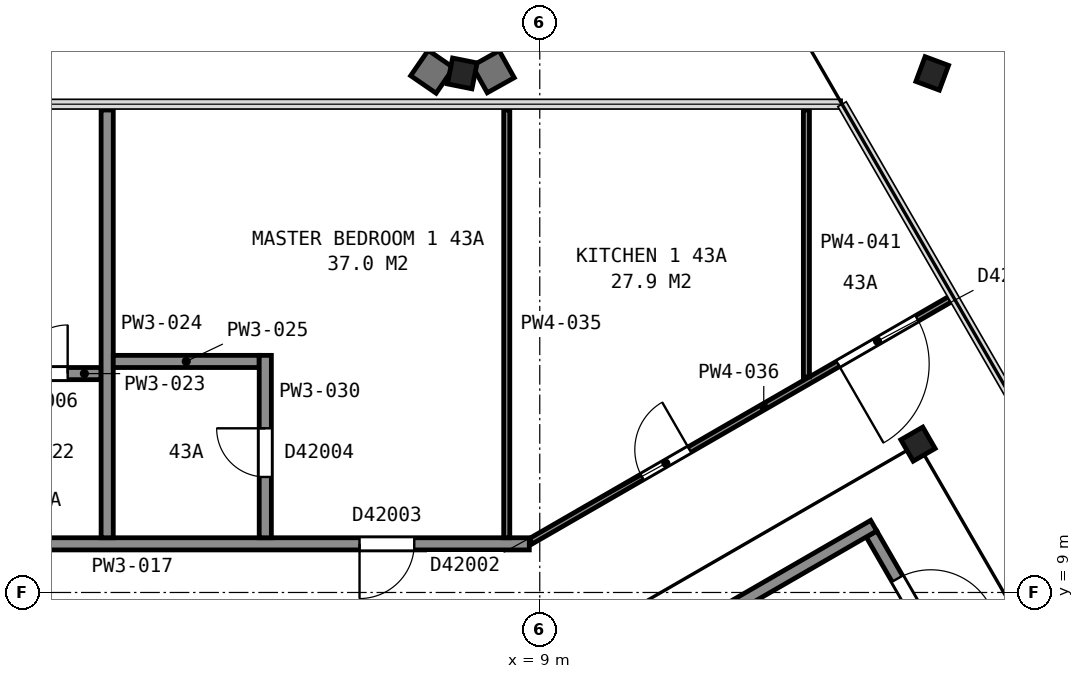
"""IFC4 building model, lengths in metres.
Left out: names, types, materials, properties, quantities, classifications, styles, units other than length and angle.
Written with IfcOpenShell. Run it as: python <this file> out.ifc"""

import sys

from ifc_helpers import new_model, si_unit, direction, frame, frame_2d, origin, origin_2d, place, context, subcontext, project, spatial, rectangle, i_section, extrude, element, fill, save


model = new_model("IFC4")
c1 = context("Model", 3, precision=1e-05, world=origin(), true_north=direction((0.0, 1.0)))
c2 = subcontext(c1, "Body", "Model", "MODEL_VIEW")
j1 = project(units=[si_unit("LENGTHUNIT", "METRE"), si_unit("PLANEANGLEUNIT", "RADIAN")], contexts=[c1])
p1 = place(None, origin())
s1 = spatial("IfcSite", under=j1, at=p1, CompositionType="ELEMENT")
p2 = place(p1, origin())
s2 = spatial("IfcBuilding", under=s1, at=p2, CompositionType="ELEMENT")
p3 = place(p2, frame((0.0, 0.0, 174.7)))
s3 = spatial("IfcBuildingStorey", under=s2, at=p3, CompositionType="ELEMENT", Elevation=174.7)
p4 = place(p3, frame((15.373, 17.318, 0.04), z_axis=(0.06888386825, 0.185431142459, 0.980239921704), x_axis=(0.997540564772, -4.290776e-05, -0.070091510131)))
e1 = element("IfcColumn", 1, at=p4, inside=s3, PredefinedType="COLUMN", context=c2, shape_type="SweptSolid", body=[
    extrude(i_section(OverallWidth=0.411, OverallDepth=0.434, WebThickness=0.036, FlangeThickness=0.057, FilletRadius=0.015, at=origin_2d()), origin(), (0.0, 0.0, 1.0), 3.693),
])
p5 = place(p3, frame((7.681, 17.317, 0.035), z_axis=(0.037114816882, 0.18577220621, 0.981891632395), x_axis=(0.999284884786, 0.000205075441, -0.037811069577)))
e2 = element("IfcColumn", 2, at=p5, inside=s3, PredefinedType="COLUMN", context=c2, shape_type="SweptSolid", body=[
    extrude(i_section(OverallWidth=0.411, OverallDepth=0.434, WebThickness=0.036, FlangeThickness=0.057, FilletRadius=0.015, at=origin_2d()), origin(), (0.0, 0.0, 1.0), 3.697),
])
p6 = place(p3, frame((15.22, 11.44, 0.0), z_axis=(0.0, 0.0, 1.0), x_axis=(0.5, -0.866025403784, 0.0)))
e3 = element("IfcColumn", 3, at=p6, inside=s3, PredefinedType="COLUMN", context=c2, shape_type="SweptSolid", body=[
    extrude(i_section(OverallWidth=0.406, OverallDepth=0.417, WebThickness=0.03, FlangeThickness=0.048, FilletRadius=0.015, at=origin_2d()), origin(), (0.0, 0.0, 1.0), 3.7),
])
p7 = place(p3, frame((15.855, 7.538, 0.0), z_axis=(0.0, 0.0, 1.0), x_axis=(-0.500049511043, 0.865996816683, 0.0)))
e4 = element("IfcWall", 4, at=p7, inside=s3, PredefinedType="PARTITIONING", context=c2, shape_type="SweptSolid", body=[
    extrude(rectangle(XDim=2.8, YDim=0.2, at=frame_2d((1.4, 0.0))), origin(), (0.0, 0.0, 1.0), 3.45),
])
p8 = place(p7, frame((0.85, 0.0, 0.0)))
e5 = element("IfcOpeningElement", 5, at=p8, cuts=e4, PredefinedType="OPENING", context=c2, shape_type="SweptSolid", body=[
    extrude(rectangle(XDim=1.1, YDim=2.1, at=frame_2d((0.55, 1.05))), frame((0.0, 0.11, 0.0), z_axis=(0.0, -1.0, 0.0), x_axis=(1.0, 0.0, 0.0)), (0.0, 0.0, 1.0), 0.22),
])
p9 = place(p3, frame((6.178, 5.299, 0.0), z_axis=(0.0, 0.0, 1.0), x_axis=(0.866019993635, 0.500009370536, 0.0)))
e6 = element("IfcWall", 6, at=p9, inside=s3, PredefinedType="PARTITIONING", context=c2, shape_type="SweptSolid", body=[
    extrude(rectangle(XDim=9.6, YDim=0.2, at=frame_2d((4.8, 0.0))), origin(), (0.0, 0.0, 1.0), 3.45),
])
p10 = place(p3, frame((-8.828, 9.8, 0.0), z_axis=(0.0, 0.0, 1.0), x_axis=(1.0, 0.0, 0.0)))
e7 = element("IfcWall", 7, at=p10, inside=s3, PredefinedType="PARTITIONING", context=c2, shape_type="SweptSolid", body=[
    extrude(rectangle(XDim=17.656, YDim=0.2, at=frame_2d((8.828, 0.0))), origin(), (0.0, 0.0, 1.0), 2.713),
])
p11 = place(p10, frame((14.864, 0.0, 0.0)))
e8 = element("IfcOpeningElement", 8, at=p11, cuts=e7, PredefinedType="OPENING", context=c2, shape_type="SweptSolid", body=[
    extrude(rectangle(XDim=0.9, YDim=2.1, at=frame_2d((0.45, 1.05))), frame((0.0, 0.11, 0.0), z_axis=(0.0, -1.0, 0.0), x_axis=(1.0, 0.0, 0.0)), (0.0, 0.0, 1.0), 0.22),
])
p12 = place(p10, frame((6.488, 0.0, 0.0)))
e9 = element("IfcOpeningElement", 9, at=p12, cuts=e7, PredefinedType="OPENING", context=c2, shape_type="SweptSolid", body=[
    extrude(rectangle(XDim=0.9, YDim=2.1, at=frame_2d((0.45, 1.05))), frame((0.0, 0.11, 0.0), z_axis=(0.0, -1.0, 0.0), x_axis=(1.0, 0.0, 0.0)), (0.0, 0.0, 1.0), 0.22),
])
p13 = place(p10, frame((2.2, 0.0, 0.0)))
e10 = element("IfcOpeningElement", 10, at=p13, cuts=e7, PredefinedType="OPENING", context=c2, shape_type="SweptSolid", body=[
    extrude(rectangle(XDim=0.9, YDim=2.1, at=frame_2d((0.45, 1.05))), frame((0.0, 0.11, 0.0), z_axis=(0.0, -1.0, 0.0), x_axis=(1.0, 0.0, 0.0)), (0.0, 0.0, 1.0), 0.22),
])
p14 = place(p3, frame((1.786, 12.6, 0.0), z_axis=(0.0, 0.0, 1.0), x_axis=(-1.0, 0.0, 0.0)))
e11 = element("IfcWall", 11, at=p14, inside=s3, PredefinedType="PARTITIONING", context=c2, shape_type="SweptSolid", body=[
    extrude(rectangle(XDim=1.9, YDim=0.2, at=frame_2d((0.95, 0.0))), origin(), (0.0, 0.0, 1.0), 2.713),
])
p15 = place(p14, frame((0.55, 0.0, 0.0)))
e12 = element("IfcOpeningElement", 12, at=p15, cuts=e11, PredefinedType="OPENING", context=c2, shape_type="SweptSolid", body=[
    extrude(rectangle(XDim=0.8, YDim=2.1, at=frame_2d((0.4, 1.05))), frame((0.0, 0.11, 0.0), z_axis=(0.0, -1.0, 0.0), x_axis=(1.0, 0.0, 0.0)), (0.0, 0.0, 1.0), 0.22),
])
p16 = place(p3, frame((1.886, 9.9, 0.0), z_axis=(0.0, 0.0, 1.0), x_axis=(0.0, 1.0, 0.0)))
e13 = element("IfcWall", 13, at=p16, inside=s3, PredefinedType="PARTITIONING", context=c2, shape_type="SweptSolid", body=[
    extrude(rectangle(XDim=7.035, YDim=0.2, at=frame_2d((3.518, 0.0))), origin(), (0.0, 0.0, 1.0), 2.713),
])
p17 = place(p3, frame((1.986, 12.8, 0.0), z_axis=(0.0, 0.0, 1.0), x_axis=(1.0, 0.0, 0.0)))
e14 = element("IfcWall", 14, at=p17, inside=s3, PredefinedType="PARTITIONING", context=c2, shape_type="SweptSolid", body=[
    extrude(rectangle(XDim=2.4, YDim=0.2, at=frame_2d((1.2, 0.0))), origin(), (0.0, 0.0, 1.0), 2.713),
])
p18 = place(p3, frame((4.486, 9.9, 0.0), z_axis=(0.0, 0.0, 1.0), x_axis=(0.0, 1.0, 0.0)))
e15 = element("IfcWall", 15, at=p18, inside=s3, PredefinedType="PARTITIONING", context=c2, shape_type="SweptSolid", body=[
    extrude(rectangle(XDim=3.0, YDim=0.2, at=frame_2d((1.5, 0.0))), origin(), (0.0, 0.0, 1.0), 2.713),
])
p19 = place(p18, frame((1.0, 0.0, 0.0)))
e16 = element("IfcOpeningElement", 16, at=p19, cuts=e15, PredefinedType="OPENING", context=c2, shape_type="SweptSolid", body=[
    extrude(rectangle(XDim=0.8, YDim=2.1, at=frame_2d((0.4, 1.05))), frame((0.0, 0.11, 0.0), z_axis=(0.0, -1.0, 0.0), x_axis=(1.0, 0.0, 0.0)), (0.0, 0.0, 1.0), 0.22),
])
p20 = place(p3, frame((8.457, 9.9, 0.0), z_axis=(0.0, 0.0, 1.0), x_axis=(0.0, 1.0, 0.0)))
e17 = element("IfcWall", 17, at=p20, inside=s3, PredefinedType="PARTITIONING", context=c2, shape_type="SweptSolid", body=[
    extrude(rectangle(XDim=7.035, YDim=0.1, at=frame_2d((3.518, 0.0))), origin(), (0.0, 0.0, 1.0), 2.713),
])
p21 = place(p3, frame((8.852, 9.843, 0.0), z_axis=(0.0, 0.0, 1.0), x_axis=(0.866086037714, 0.499894964244, 0.0)))
e18 = element("IfcWall", 18, at=p21, inside=s3, PredefinedType="PARTITIONING", context=c2, shape_type="SweptSolid", body=[
    extrude(rectangle(XDim=7.963, YDim=0.1, at=frame_2d((3.981, 0.0))), origin(), (0.0, 0.0, 1.0), 2.713),
])
p22 = place(p21, frame((5.834, 0.0, 0.0)))
e19 = element("IfcOpeningElement", 19, at=p22, cuts=e18, PredefinedType="OPENING", context=c2, shape_type="SweptSolid", body=[
    extrude(rectangle(XDim=1.5, YDim=2.1, at=frame_2d((0.75, 1.05))), frame((0.0, 0.06, 0.0), z_axis=(0.0, -1.0, 0.0), x_axis=(1.0, 0.0, 0.0)), (0.0, 0.0, 1.0), 0.12),
])
p23 = place(p21, frame((2.115, 0.0, 0.0)))
e20 = element("IfcOpeningElement", 20, at=p23, cuts=e18, PredefinedType="OPENING", context=c2, shape_type="SweptSolid", body=[
    extrude(rectangle(XDim=0.9, YDim=2.1, at=frame_2d((0.45, 1.05))), frame((0.0, 0.06, 0.0), z_axis=(0.0, -1.0, 0.0), x_axis=(1.0, 0.0, 0.0)), (0.0, 0.0, 1.0), 0.12),
])
p24 = place(p3, frame((13.385, 12.546, 0.0), z_axis=(0.0, 0.0, 1.0), x_axis=(0.0, 1.0, 0.0)))
e21 = element("IfcWall", 21, at=p24, inside=s3, PredefinedType="PARTITIONING", context=c2, shape_type="SweptSolid", body=[
    extrude(rectangle(XDim=4.389, YDim=0.1, at=frame_2d((2.195, 0.0))), origin(), (0.0, 0.0, 1.0), 2.713),
])
p25 = place(p8, origin())
e22 = element("IfcDoor", 22, at=p25, inside=s3, OperationType="SINGLE_SWING_LEFT", PredefinedType="DOOR", context=c2, shape_type="SweptSolid", body=[
    extrude(rectangle(XDim=1.1, YDim=2.1, at=frame_2d((0.55, 1.05))), frame((0.0, 0.025, 0.0), z_axis=(0.0, -1.0, 0.0), x_axis=(1.0, 0.0, 0.0)), (0.0, 0.0, 1.0), 0.05),
])
fill(e5, e22)
p26 = place(p11, origin())
e23 = element("IfcDoor", 23, at=p26, inside=s3, OperationType="SINGLE_SWING_LEFT", PredefinedType="DOOR", context=c2, shape_type="SweptSolid", body=[
    extrude(rectangle(XDim=0.9, YDim=2.1, at=frame_2d((0.45, 1.05))), frame((0.0, 0.025, 0.0), z_axis=(0.0, -1.0, 0.0), x_axis=(1.0, 0.0, 0.0)), (0.0, 0.0, 1.0), 0.05),
])
fill(e8, e23)
p27 = place(p15, origin())
e24 = element("IfcDoor", 24, at=p27, inside=s3, OperationType="SINGLE_SWING_LEFT", PredefinedType="DOOR", context=c2, shape_type="SweptSolid", body=[
    extrude(rectangle(XDim=0.8, YDim=2.1, at=frame_2d((0.4, 1.05))), frame((0.0, 0.025, 0.0), z_axis=(0.0, -1.0, 0.0), x_axis=(1.0, 0.0, 0.0)), (0.0, 0.0, 1.0), 0.05),
])
fill(e12, e24)
p28 = place(p19, origin())
e25 = element("IfcDoor", 25, at=p28, inside=s3, OperationType="SINGLE_SWING_RIGHT", PredefinedType="DOOR", context=c2, shape_type="SweptSolid", body=[
    extrude(rectangle(XDim=0.8, YDim=2.1, at=frame_2d((0.4, 1.05))), frame((0.0, 0.025, 0.0), z_axis=(0.0, -1.0, 0.0), x_axis=(1.0, 0.0, 0.0)), (0.0, 0.0, 1.0), 0.05),
])
fill(e16, e25)
p29 = place(p22, origin())
e26 = element("IfcDoor", 26, at=p29, inside=s3, OperationType="DOUBLE_DOOR_SINGLE_SWING", PredefinedType="DOOR", context=c2, shape_type="SweptSolid", body=[
    extrude(rectangle(XDim=1.5, YDim=2.1, at=frame_2d((0.75, 1.05))), frame((0.0, 0.025, 0.0), z_axis=(0.0, -1.0, 0.0), x_axis=(1.0, 0.0, 0.0)), (0.0, 0.0, 1.0), 0.05),
])
fill(e19, e26)
p30 = place(p23, origin())
e27 = element("IfcDoor", 27, at=p30, inside=s3, OperationType="SINGLE_SWING_RIGHT", PredefinedType="DOOR", context=c2, shape_type="SweptSolid", body=[
    extrude(rectangle(XDim=0.9, YDim=2.1, at=frame_2d((0.45, 1.05))), frame((0.0, 0.025, 0.0), z_axis=(0.0, -1.0, 0.0), x_axis=(1.0, 0.0, 0.0)), (0.0, 0.0, 1.0), 0.05),
])
fill(e20, e27)
save(model, sys.argv[1])
